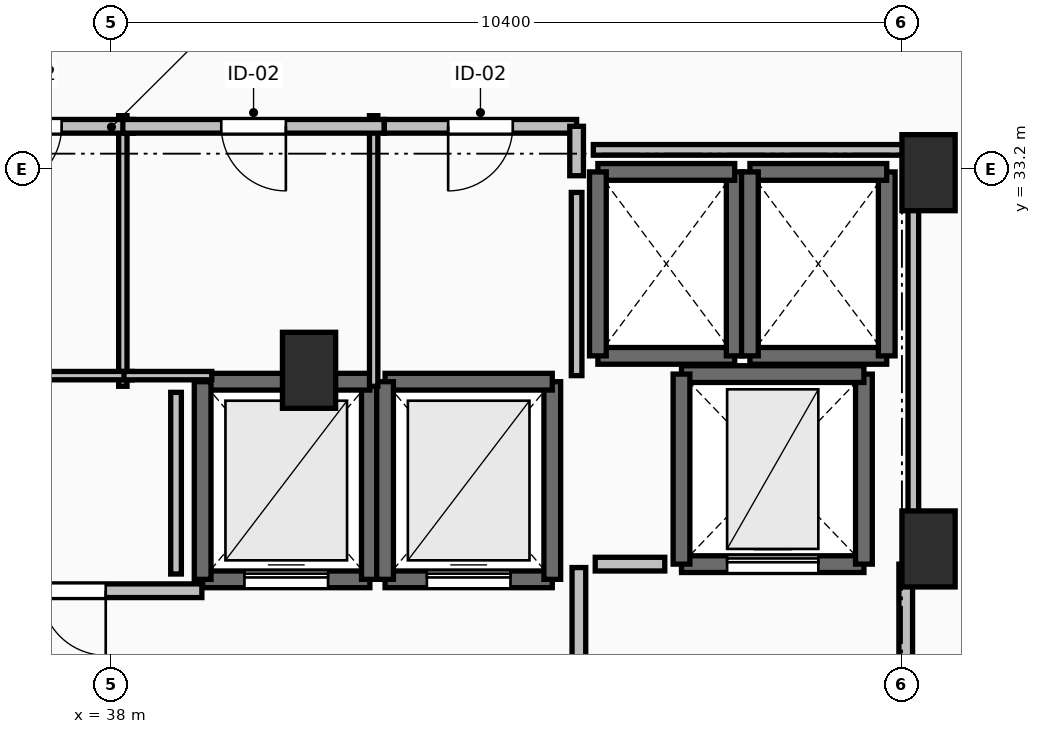
"""IFC4 building model, lengths in metres.
Left out: names, types, materials, properties, quantities, classifications, styles, units other than length and angle.
Written with IfcOpenShell. Run it as: python <this file> out.ifc"""

import sys

from ifc_helpers import new_model, si_unit, direction, frame, frame_2d, origin, origin_2d, place, context, subcontext, project, spatial, rectangle, extrude, element, fill, save


model = new_model("IFC4")
c1 = context("Model", 3, precision=1e-05, world=origin(), true_north=direction((0.0, 1.0)))
c2 = subcontext(c1, "Body", "Model", "MODEL_VIEW")
j1 = project(units=[si_unit("LENGTHUNIT", "METRE"), si_unit("PLANEANGLEUNIT", "RADIAN")], contexts=[c1])
p1 = place(None, origin())
s1 = spatial("IfcSite", under=j1, at=p1, CompositionType="ELEMENT")
p2 = place(p1, origin())
s2 = spatial("IfcBuilding", under=s1, at=p2, CompositionType="ELEMENT")
p3 = place(p2, frame((0.0, 0.0, 248.45)))
s3 = spatial("IfcBuildingStorey", under=s2, at=p3, CompositionType="ELEMENT", Elevation=248.45)
for number, where, z_axis, x_axis in (
    (1, (48.75, 33.15, 0.0), (0.0, 0.0, 1.0), (1.0, 0.0, 0.0)),
    (2, (48.75, 28.2, 0.0), (0.0, 0.0, 1.0), (1.0, 0.0, 0.0)),
    (3, (40.6, 30.55, 0.0), (0.0, 0.0, 1.0), (1.0, 0.0, 0.0)),
):
    element("IfcColumn", number, at=place(p3, frame(where, z_axis=z_axis, x_axis=x_axis)), inside=s3, PredefinedType="PILASTER", context=c2, shape_type="SweptSolid", body=[
        extrude(rectangle(XDim=0.7, YDim=1.0, at=origin_2d()), origin(), (0.0, 0.0, 1.0), 3.55),
    ])
p4 = place(p3, frame((39.2, 27.8, 0.0), z_axis=(0.0, 0.0, 1.0), x_axis=(1.0, 0.0, 0.0)))
e4 = element("IfcWall", 4, at=p4, inside=s3, PredefinedType="SOLIDWALL", context=c2, shape_type="SweptSolid", body=[
    extrude(rectangle(XDim=2.2, YDim=0.22, at=frame_2d((1.1, 0.0))), origin(), (0.0, 0.0, 1.0), 3.29),
])
p5 = place(p4, frame((0.55, 0.0, 0.0)))
e5 = element("IfcOpeningElement", 5, at=p5, cuts=e4, PredefinedType="OPENING", context=c2, shape_type="SweptSolid", body=[
    extrude(rectangle(XDim=1.1, YDim=2.2, at=frame_2d((0.55, 1.1))), frame((0.0, 0.125, 0.0), z_axis=(0.0, -1.0, 0.0), x_axis=(1.0, 0.0, 0.0)), (0.0, 0.0, 1.0), 0.25),
])
p6 = place(p3, frame((41.4, 27.8, 0.0), z_axis=(0.0, 0.0, 1.0), x_axis=(0.0, 1.0, 0.0)))
e6 = element("IfcWall", 6, at=p6, inside=s3, PredefinedType="SOLIDWALL", context=c2, shape_type="SweptSolid", body=[
    extrude(rectangle(XDim=2.6, YDim=0.22, at=frame_2d((1.3, 0.0))), origin(), (0.0, 0.0, 1.0), 3.29),
])
p7 = place(p3, frame((41.4, 30.4, 0.0), z_axis=(0.0, 0.0, 1.0), x_axis=(-1.0, 0.0, 0.0)))
e7 = element("IfcWall", 7, at=p7, inside=s3, PredefinedType="SOLIDWALL", context=c2, shape_type="SweptSolid", body=[
    extrude(rectangle(XDim=2.2, YDim=0.22, at=frame_2d((1.1, 0.0))), origin(), (0.0, 0.0, 1.0), 3.29),
])
p8 = place(p3, frame((39.2, 30.4, 0.0), z_axis=(0.0, 0.0, 1.0), x_axis=(0.0, -1.0, 0.0)))
e8 = element("IfcWall", 8, at=p8, inside=s3, PredefinedType="SOLIDWALL", context=c2, shape_type="SweptSolid", body=[
    extrude(rectangle(XDim=2.6, YDim=0.22, at=frame_2d((1.3, 0.0))), origin(), (0.0, 0.0, 1.0), 3.29),
])
p9 = place(p3, frame((41.6, 27.8, 0.0), z_axis=(0.0, 0.0, 1.0), x_axis=(1.0, 0.0, 0.0)))
e9 = element("IfcWall", 9, at=p9, inside=s3, PredefinedType="SOLIDWALL", context=c2, shape_type="SweptSolid", body=[
    extrude(rectangle(XDim=2.2, YDim=0.22, at=frame_2d((1.1, 0.0))), origin(), (0.0, 0.0, 1.0), 3.29),
])
p10 = place(p9, frame((0.55, 0.0, 0.0)))
e10 = element("IfcOpeningElement", 10, at=p10, cuts=e9, PredefinedType="OPENING", context=c2, shape_type="SweptSolid", body=[
    extrude(rectangle(XDim=1.1, YDim=2.2, at=frame_2d((0.55, 1.1))), frame((0.0, 0.125, 0.0), z_axis=(0.0, -1.0, 0.0), x_axis=(1.0, 0.0, 0.0)), (0.0, 0.0, 1.0), 0.25),
])
p11 = place(p3, frame((43.8, 27.8, 0.0), z_axis=(0.0, 0.0, 1.0), x_axis=(0.0, 1.0, 0.0)))
e11 = element("IfcWall", 11, at=p11, inside=s3, PredefinedType="SOLIDWALL", context=c2, shape_type="SweptSolid", body=[
    extrude(rectangle(XDim=2.6, YDim=0.22, at=frame_2d((1.3, 0.0))), origin(), (0.0, 0.0, 1.0), 3.29),
])
p12 = place(p3, frame((43.8, 30.4, 0.0), z_axis=(0.0, 0.0, 1.0), x_axis=(-1.0, 0.0, 0.0)))
e12 = element("IfcWall", 12, at=p12, inside=s3, PredefinedType="SOLIDWALL", context=c2, shape_type="SweptSolid", body=[
    extrude(rectangle(XDim=2.2, YDim=0.22, at=frame_2d((1.1, 0.0))), origin(), (0.0, 0.0, 1.0), 3.29),
])
p13 = place(p3, frame((41.6, 30.4, 0.0), z_axis=(0.0, 0.0, 1.0), x_axis=(0.0, -1.0, 0.0)))
e13 = element("IfcWall", 13, at=p13, inside=s3, PredefinedType="SOLIDWALL", context=c2, shape_type="SweptSolid", body=[
    extrude(rectangle(XDim=2.6, YDim=0.22, at=frame_2d((1.3, 0.0))), origin(), (0.0, 0.0, 1.0), 3.29),
])
p14 = place(p3, frame((44.4, 30.74, 0.0), z_axis=(0.0, 0.0, 1.0), x_axis=(1.0, 0.0, 0.0)))
e14 = element("IfcWall", 14, at=p14, inside=s3, PredefinedType="SOLIDWALL", context=c2, shape_type="SweptSolid", body=[
    extrude(rectangle(XDim=1.8, YDim=0.22, at=frame_2d((0.9, 0.0))), origin(), (0.0, 0.0, 1.0), 3.29),
])
p15 = place(p3, frame((46.2, 30.74, 0.0), z_axis=(0.0, 0.0, 1.0), x_axis=(0.0, 1.0, 0.0)))
e15 = element("IfcWall", 15, at=p15, inside=s3, PredefinedType="SOLIDWALL", context=c2, shape_type="SweptSolid", body=[
    extrude(rectangle(XDim=2.42, YDim=0.22, at=frame_2d((1.21, 0.0))), origin(), (0.0, 0.0, 1.0), 3.29),
])
p16 = place(p3, frame((46.2, 33.16, 0.0), z_axis=(0.0, 0.0, 1.0), x_axis=(-1.0, 0.0, 0.0)))
e16 = element("IfcWall", 16, at=p16, inside=s3, PredefinedType="SOLIDWALL", context=c2, shape_type="SweptSolid", body=[
    extrude(rectangle(XDim=1.8, YDim=0.22, at=frame_2d((0.9, 0.0))), origin(), (0.0, 0.0, 1.0), 3.29),
])
p17 = place(p3, frame((44.4, 33.16, 0.0), z_axis=(0.0, 0.0, 1.0), x_axis=(0.0, -1.0, 0.0)))
e17 = element("IfcWall", 17, at=p17, inside=s3, PredefinedType="SOLIDWALL", context=c2, shape_type="SweptSolid", body=[
    extrude(rectangle(XDim=2.42, YDim=0.22, at=frame_2d((1.21, 0.0))), origin(), (0.0, 0.0, 1.0), 3.29),
])
p18 = place(p3, frame((46.4, 30.74, 0.0), z_axis=(0.0, 0.0, 1.0), x_axis=(1.0, 0.0, 0.0)))
e18 = element("IfcWall", 18, at=p18, inside=s3, PredefinedType="SOLIDWALL", context=c2, shape_type="SweptSolid", body=[
    extrude(rectangle(XDim=1.8, YDim=0.22, at=frame_2d((0.9, 0.0))), origin(), (0.0, 0.0, 1.0), 3.29),
])
p19 = place(p3, frame((48.2, 30.74, 0.0), z_axis=(0.0, 0.0, 1.0), x_axis=(0.0, 1.0, 0.0)))
e19 = element("IfcWall", 19, at=p19, inside=s3, PredefinedType="SOLIDWALL", context=c2, shape_type="SweptSolid", body=[
    extrude(rectangle(XDim=2.42, YDim=0.22, at=frame_2d((1.21, 0.0))), origin(), (0.0, 0.0, 1.0), 3.29),
])
p20 = place(p3, frame((48.2, 33.16, 0.0), z_axis=(0.0, 0.0, 1.0), x_axis=(-1.0, 0.0, 0.0)))
e20 = element("IfcWall", 20, at=p20, inside=s3, PredefinedType="SOLIDWALL", context=c2, shape_type="SweptSolid", body=[
    extrude(rectangle(XDim=1.8, YDim=0.22, at=frame_2d((0.9, 0.0))), origin(), (0.0, 0.0, 1.0), 3.29),
])
p21 = place(p3, frame((46.4, 33.16, 0.0), z_axis=(0.0, 0.0, 1.0), x_axis=(0.0, -1.0, 0.0)))
e21 = element("IfcWall", 21, at=p21, inside=s3, PredefinedType="SOLIDWALL", context=c2, shape_type="SweptSolid", body=[
    extrude(rectangle(XDim=2.42, YDim=0.22, at=frame_2d((1.21, 0.0))), origin(), (0.0, 0.0, 1.0), 3.29),
])
p22 = place(p3, frame((45.5, 28.0, 0.0), z_axis=(0.0, 0.0, 1.0), x_axis=(1.0, 0.0, 0.0)))
e22 = element("IfcWall", 22, at=p22, inside=s3, PredefinedType="SHEAR", context=c2, shape_type="SweptSolid", body=[
    extrude(rectangle(XDim=2.4, YDim=0.22, at=frame_2d((1.2, 0.0))), origin(), (0.0, 0.0, 1.0), 3.29),
])
p23 = place(p22, frame((0.6, 0.0, 0.0)))
e23 = element("IfcOpeningElement", 23, at=p23, cuts=e22, PredefinedType="OPENING", context=c2, shape_type="SweptSolid", body=[
    extrude(rectangle(XDim=1.2, YDim=2.2, at=frame_2d((0.6, 1.1))), frame((0.0, 0.125, 0.0), z_axis=(0.0, -1.0, 0.0), x_axis=(1.0, 0.0, 0.0)), (0.0, 0.0, 1.0), 0.25),
])
p24 = place(p3, frame((47.9, 28.0, 0.0), z_axis=(0.0, 0.0, 1.0), x_axis=(0.0, 1.0, 0.0)))
e24 = element("IfcWall", 24, at=p24, inside=s3, PredefinedType="SHEAR", context=c2, shape_type="SweptSolid", body=[
    extrude(rectangle(XDim=2.5, YDim=0.22, at=frame_2d((1.25, 0.0))), origin(), (0.0, 0.0, 1.0), 3.29),
])
p25 = place(p3, frame((47.9, 30.5, 0.0), z_axis=(0.0, 0.0, 1.0), x_axis=(-1.0, 0.0, 0.0)))
e25 = element("IfcWall", 25, at=p25, inside=s3, PredefinedType="SHEAR", context=c2, shape_type="SweptSolid", body=[
    extrude(rectangle(XDim=2.4, YDim=0.22, at=frame_2d((1.2, 0.0))), origin(), (0.0, 0.0, 1.0), 3.29),
])
p26 = place(p3, frame((45.5, 30.5, 0.0), z_axis=(0.0, 0.0, 1.0), x_axis=(0.0, -1.0, 0.0)))
e26 = element("IfcWall", 26, at=p26, inside=s3, PredefinedType="SHEAR", context=c2, shape_type="SweptSolid", body=[
    extrude(rectangle(XDim=2.5, YDim=0.22, at=frame_2d((1.25, 0.0))), origin(), (0.0, 0.0, 1.0), 3.29),
])
p27 = place(p3, frame((44.15, 27.955, 0.0), z_axis=(0.0, 0.0, 1.0), x_axis=(0.0, -1.0, 0.0)))
e27 = element("IfcWall", 27, at=p27, inside=s3, PredefinedType="PARTITIONING", context=c2, shape_type="SweptSolid", body=[
    extrude(rectangle(XDim=3.91, YDim=0.18, at=frame_2d((1.955, 0.0))), origin(), (0.0, 0.0, 1.0), 3.29),
])
p28 = place(p27, frame((1.355, 0.0, 0.0)))
e28 = element("IfcOpeningElement", 28, at=p28, cuts=e27, PredefinedType="OPENING", context=c2, shape_type="SweptSolid", body=[
    extrude(rectangle(XDim=1.2, YDim=2.15, at=frame_2d((0.6, 1.075))), frame((0.0, 0.105, 0.0), z_axis=(0.0, -1.0, 0.0), x_axis=(1.0, 0.0, 0.0)), (0.0, 0.0, 1.0), 0.21),
])
p29 = place(p3, frame((48.45, 23.95, 0.0), z_axis=(0.0, 0.0, 1.0), x_axis=(0.0, 1.0, 0.0)))
e29 = element("IfcWall", 29, at=p29, inside=s3, PredefinedType="PARTITIONING", context=c2, shape_type="SweptSolid", body=[
    extrude(rectangle(XDim=4.05, YDim=0.18, at=frame_2d((2.025, 0.0))), origin(), (0.0, 0.0, 1.0), 3.29),
])
p30 = place(p29, frame((1.425, 0.0, 0.0)))
e30 = element("IfcOpeningElement", 30, at=p30, cuts=e29, PredefinedType="OPENING", context=c2, shape_type="SweptSolid", body=[
    extrude(rectangle(XDim=1.2, YDim=2.15, at=frame_2d((0.6, 1.075))), frame((0.0, 0.105, 0.0), z_axis=(0.0, -1.0, 0.0), x_axis=(1.0, 0.0, 0.0)), (0.0, 0.0, 1.0), 0.21),
])
p31 = place(p3, frame((39.19, 27.65, 0.0), z_axis=(0.0, 0.0, 1.0), x_axis=(-1.0, 0.0, 0.0)))
e31 = element("IfcWall", 31, at=p31, inside=s3, PredefinedType="PARTITIONING", context=c2, shape_type="SweptSolid", body=[
    extrude(rectangle(XDim=3.38, YDim=0.18, at=frame_2d((1.69, 0.0))), origin(), (0.0, 0.0, 1.0), 3.29),
])
p32 = place(p31, frame((1.265, 0.0, 0.0)))
e32 = element("IfcOpeningElement", 32, at=p32, cuts=e31, PredefinedType="OPENING", context=c2, shape_type="SweptSolid", body=[
    extrude(rectangle(XDim=0.85, YDim=2.1, at=frame_2d((0.425, 1.05))), frame((0.0, 0.105, 0.0), z_axis=(0.0, -1.0, 0.0), x_axis=(1.0, 0.0, 0.0)), (0.0, 0.0, 1.0), 0.21),
])
p33 = place(p3, frame((38.15, 30.34, 0.0), z_axis=(0.0, 0.0, 1.0), x_axis=(0.0, 1.0, 0.0)))
e33 = element("IfcWall", 33, at=p33, inside=s3, PredefinedType="PARTITIONING", context=c2, shape_type="SweptSolid", body=[
    extrude(rectangle(XDim=3.56, YDim=0.11, at=frame_2d((1.78, 0.0))), origin(), (0.0, 0.0, 1.0), 2.482),
])
p34 = place(p3, frame((35.68, 30.48, 0.0), z_axis=(0.0, 0.0, 1.0), x_axis=(1.0, 0.0, 0.0)))
e34 = element("IfcWall", 34, at=p34, inside=s3, PredefinedType="PARTITIONING", context=c2, shape_type="SweptSolid", body=[
    extrude(rectangle(XDim=2.595, YDim=0.11, at=frame_2d((1.297, 0.0))), origin(), (0.0, 0.0, 1.0), 2.482),
])
p35 = place(p3, frame((38.29, 33.76, 0.0), z_axis=(0.0, 0.0, 1.0), x_axis=(-1.0, 0.0, 0.0)))
e35 = element("IfcWall", 35, at=p35, inside=s3, PredefinedType="PARTITIONING", context=c2, shape_type="SweptSolid", body=[
    extrude(rectangle(XDim=2.74, YDim=0.18, at=frame_2d((1.37, 0.0))), origin(), (0.0, 0.0, 1.0), 3.29),
])
p36 = place(p35, frame((0.945, 0.0, 0.0)))
e36 = element("IfcOpeningElement", 36, at=p36, cuts=e35, PredefinedType="OPENING", context=c2, shape_type="SweptSolid", body=[
    extrude(rectangle(XDim=0.85, YDim=2.1, at=frame_2d((0.425, 1.05))), frame((0.0, 0.105, 0.0), z_axis=(0.0, -1.0, 0.0), x_axis=(1.0, 0.0, 0.0)), (0.0, 0.0, 1.0), 0.21),
])
p37 = place(p3, frame((41.45, 30.34, 0.0), z_axis=(0.0, 0.0, 1.0), x_axis=(0.0, 1.0, 0.0)))
e37 = element("IfcWall", 37, at=p37, inside=s3, PredefinedType="PARTITIONING", context=c2, shape_type="SweptSolid", body=[
    extrude(rectangle(XDim=3.56, YDim=0.11, at=frame_2d((1.78, 0.0))), origin(), (0.0, 0.0, 1.0), 3.29),
])
p38 = place(p3, frame((38.165, 30.48, 0.0), z_axis=(0.0, 0.0, 1.0), x_axis=(1.0, 0.0, 0.0)))
e38 = element("IfcWall", 38, at=p38, inside=s3, PredefinedType="PARTITIONING", context=c2, shape_type="SweptSolid", body=[
    extrude(rectangle(XDim=1.155, YDim=0.11, at=frame_2d((0.578, 0.0))), origin(), (0.0, 0.0, 1.0), 2.482),
])
p39 = place(p3, frame((41.59, 33.76, 0.0), z_axis=(0.0, 0.0, 1.0), x_axis=(-1.0, 0.0, 0.0)))
e39 = element("IfcWall", 39, at=p39, inside=s3, PredefinedType="PARTITIONING", context=c2, shape_type="SweptSolid", body=[
    extrude(rectangle(XDim=3.44, YDim=0.18, at=frame_2d((1.72, 0.0))), origin(), (0.0, 0.0, 1.0), 3.29),
])
p40 = place(p39, frame((1.295, 0.0, 0.0)))
e40 = element("IfcOpeningElement", 40, at=p40, cuts=e39, PredefinedType="OPENING", context=c2, shape_type="SweptSolid", body=[
    extrude(rectangle(XDim=0.85, YDim=2.1, at=frame_2d((0.425, 1.05))), frame((0.0, 0.105, 0.0), z_axis=(0.0, -1.0, 0.0), x_axis=(1.0, 0.0, 0.0)), (0.0, 0.0, 1.0), 0.21),
])
p41 = place(p3, frame((44.12, 33.76, 0.0), z_axis=(0.0, 0.0, 1.0), x_axis=(-1.0, 0.0, 0.0)))
e41 = element("IfcWall", 41, at=p41, inside=s3, PredefinedType="PARTITIONING", context=c2, shape_type="SweptSolid", body=[
    extrude(rectangle(XDim=2.53, YDim=0.18, at=frame_2d((1.265, 0.0))), origin(), (0.0, 0.0, 1.0), 3.29),
])
p42 = place(p41, frame((0.84, 0.0, 0.0)))
e42 = element("IfcOpeningElement", 42, at=p42, cuts=e41, PredefinedType="OPENING", context=c2, shape_type="SweptSolid", body=[
    extrude(rectangle(XDim=0.85, YDim=2.1, at=frame_2d((0.425, 1.05))), frame((0.0, 0.105, 0.0), z_axis=(0.0, -1.0, 0.0), x_axis=(1.0, 0.0, 0.0)), (0.0, 0.0, 1.0), 0.21),
])
p43 = place(p3, frame((44.12, 33.11, 0.0), z_axis=(0.0, 0.0, 1.0), x_axis=(0.0, 1.0, 0.0)))
e43 = element("IfcWall", 43, at=p43, inside=s3, PredefinedType="PARTITIONING", context=c2, shape_type="SweptSolid", body=[
    extrude(rectangle(XDim=0.65, YDim=0.18, at=frame_2d((0.325, 0.0))), origin(), (0.0, 0.0, 1.0), 3.29),
])
p44 = place(p3, frame((45.28, 28.0, 0.0), z_axis=(0.0, 0.0, 1.0), x_axis=(-1.0, 0.0, 0.0)))
e44 = element("IfcWall", 44, at=p44, inside=s3, PredefinedType="PARTITIONING", context=c2, shape_type="SweptSolid", body=[
    extrude(rectangle(XDim=0.915, YDim=0.18, at=frame_2d((0.458, 0.0))), origin(), (0.0, 0.0, 1.0), 3.29),
])
p45 = place(p3, frame((44.12, 30.48, 0.0), z_axis=(0.0, 0.0, 1.0), x_axis=(0.0, 1.0, 0.0)))
e45 = element("IfcWall", 45, at=p45, inside=s3, PredefinedType="PARTITIONING", context=c2, shape_type="SweptSolid", body=[
    extrude(rectangle(XDim=2.41, YDim=0.14, at=frame_2d((1.205, 0.0))), origin(), (0.0, 0.0, 1.0), 3.29),
])
p46 = place(p3, frame((38.85, 27.87, 0.0), z_axis=(0.0, 0.0, 1.0), x_axis=(0.0, 1.0, 0.0)))
e46 = element("IfcWall", 46, at=p46, inside=s3, PredefinedType="PARTITIONING", context=c2, shape_type="SweptSolid", body=[
    extrude(rectangle(XDim=2.39, YDim=0.14, at=frame_2d((1.195, 0.0))), origin(), (0.0, 0.0, 1.0), 3.29),
])
p47 = place(p3, frame((48.55, 28.196, 0.0), z_axis=(0.0, 0.0, 1.0), x_axis=(0.0, 1.0, 0.0)))
e47 = element("IfcWall", 47, at=p47, inside=s3, PredefinedType="PARTITIONING", context=c2, shape_type="SweptSolid", body=[
    extrude(rectangle(XDim=5.254, YDim=0.14, at=frame_2d((2.627, 0.0))), origin(), (0.0, 0.0, 1.0), 2.482),
])
p48 = place(p3, frame((48.55, 33.45, 0.0), z_axis=(0.0, 0.0, 1.0), x_axis=(-1.0, 0.0, 0.0)))
e48 = element("IfcWall", 48, at=p48, inside=s3, PredefinedType="PARTITIONING", context=c2, shape_type="SweptSolid", body=[
    extrude(rectangle(XDim=4.21, YDim=0.14, at=frame_2d((2.105, 0.0))), origin(), (0.0, 0.0, 1.0), 2.482),
])
p49 = place(p5, origin())
e49 = element("IfcDoor", 49, at=p49, inside=s3, OperationType="SLIDING_TO_LEFT", PredefinedType="DOOR", context=c2, shape_type="SweptSolid", body=[
    extrude(rectangle(XDim=1.1, YDim=2.2, at=frame_2d((0.55, 1.1))), frame((0.0, 0.025, 0.0), z_axis=(0.0, -1.0, 0.0), x_axis=(1.0, 0.0, 0.0)), (0.0, 0.0, 1.0), 0.05),
])
fill(e5, e49)
p50 = place(p10, origin())
e50 = element("IfcDoor", 50, at=p50, inside=s3, OperationType="SLIDING_TO_LEFT", PredefinedType="DOOR", context=c2, shape_type="SweptSolid", body=[
    extrude(rectangle(XDim=1.1, YDim=2.2, at=frame_2d((0.55, 1.1))), frame((0.0, 0.025, 0.0), z_axis=(0.0, -1.0, 0.0), x_axis=(1.0, 0.0, 0.0)), (0.0, 0.0, 1.0), 0.05),
])
fill(e10, e50)
p51 = place(p23, origin())
e51 = element("IfcDoor", 51, at=p51, inside=s3, OperationType="SLIDING_TO_LEFT", PredefinedType="DOOR", context=c2, shape_type="SweptSolid", body=[
    extrude(rectangle(XDim=1.2, YDim=2.2, at=frame_2d((0.6, 1.1))), frame((0.0, 0.025, 0.0), z_axis=(0.0, -1.0, 0.0), x_axis=(1.0, 0.0, 0.0)), (0.0, 0.0, 1.0), 0.05),
])
fill(e23, e51)
p52 = place(p32, origin())
e52 = element("IfcDoor", 52, at=p52, inside=s3, OperationType="SINGLE_SWING_LEFT", PredefinedType="DOOR", context=c2, shape_type="SweptSolid", body=[
    extrude(rectangle(XDim=0.85, YDim=2.1, at=frame_2d((0.425, 1.05))), frame((0.0, 0.025, 0.0), z_axis=(0.0, -1.0, 0.0), x_axis=(1.0, 0.0, 0.0)), (0.0, 0.0, 1.0), 0.05),
])
fill(e32, e52)
p53 = place(p36, origin())
e53 = element("IfcDoor", 53, at=p53, inside=s3, OperationType="SINGLE_SWING_RIGHT", PredefinedType="DOOR", context=c2, shape_type="SweptSolid", body=[
    extrude(rectangle(XDim=0.85, YDim=2.1, at=frame_2d((0.425, 1.05))), frame((0.0, 0.025, 0.0), z_axis=(0.0, -1.0, 0.0), x_axis=(1.0, 0.0, 0.0)), (0.0, 0.0, 1.0), 0.05),
])
fill(e36, e53)
p54 = place(p40, origin())
e54 = element("IfcDoor", 54, at=p54, inside=s3, OperationType="SINGLE_SWING_LEFT", PredefinedType="DOOR", context=c2, shape_type="SweptSolid", body=[
    extrude(rectangle(XDim=0.85, YDim=2.1, at=frame_2d((0.425, 1.05))), frame((0.0, 0.025, 0.0), z_axis=(0.0, -1.0, 0.0), x_axis=(1.0, 0.0, 0.0)), (0.0, 0.0, 1.0), 0.05),
])
fill(e40, e54)
p55 = place(p42, origin())
e55 = element("IfcDoor", 55, at=p55, inside=s3, OperationType="SINGLE_SWING_RIGHT", PredefinedType="DOOR", context=c2, shape_type="SweptSolid", body=[
    extrude(rectangle(XDim=0.85, YDim=2.1, at=frame_2d((0.425, 1.05))), frame((0.0, 0.025, 0.0), z_axis=(0.0, -1.0, 0.0), x_axis=(1.0, 0.0, 0.0)), (0.0, 0.0, 1.0), 0.05),
])
fill(e42, e55)
save(model, sys.argv[1])
